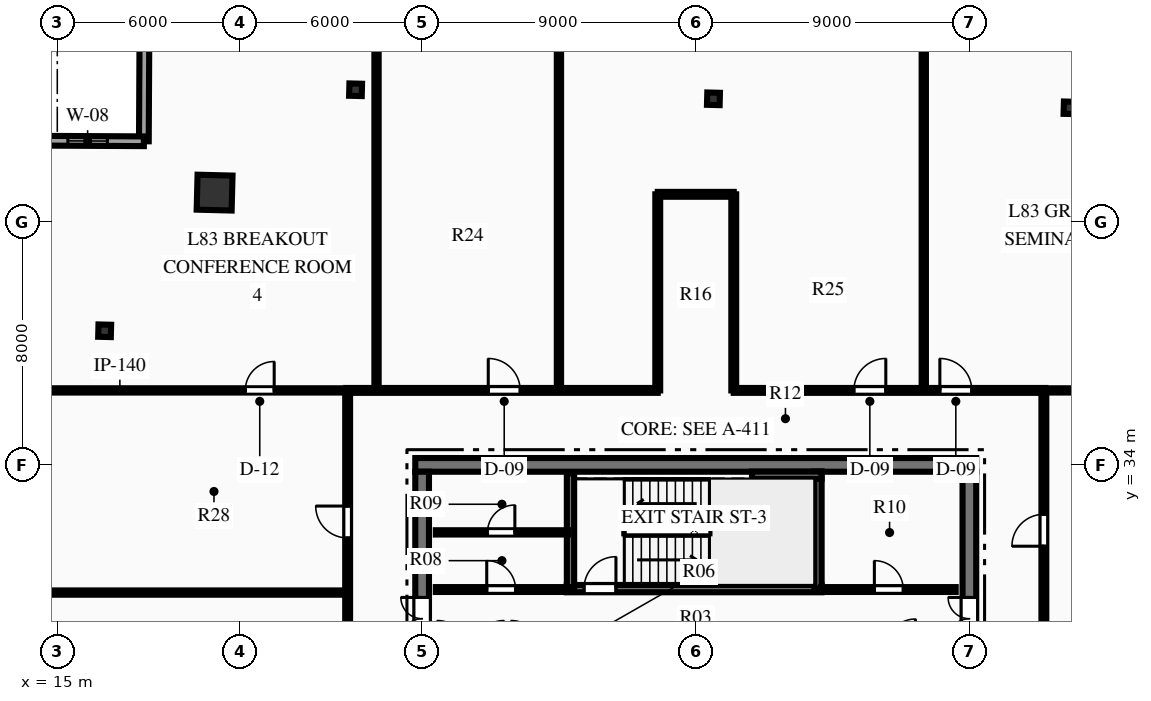
"""IFC4 building model, lengths in metres.
Left out: names, types, materials, properties, quantities, classifications, styles, units other than length and angle.
Written with IfcOpenShell. Run it as: python <this file> out.ifc"""

import sys

from ifc_helpers import new_model, si_unit, direction, frame, frame_2d, origin, origin_2d, place, context, subcontext, project, spatial, rectangle, hollow_rectangle, i_section, extrude, element, fill, save


model = new_model("IFC4")
c1 = context("Model", 3, precision=1e-05, world=origin(), true_north=direction((0.0, 1.0)))
c2 = subcontext(c1, "Body", "Model", "MODEL_VIEW")
j1 = project(units=[si_unit("LENGTHUNIT", "METRE"), si_unit("PLANEANGLEUNIT", "RADIAN")], contexts=[c1])
p1 = place(None, origin())
s1 = spatial("IfcSite", under=j1, at=p1, CompositionType="ELEMENT")
p2 = place(p1, origin())
s2 = spatial("IfcBuilding", under=s1, at=p2, CompositionType="ELEMENT")
p3 = place(p2, frame((0.0, 0.0, 328.95)))
s3 = spatial("IfcBuildingStorey", under=s2, at=p3, CompositionType="ELEMENT", Elevation=328.95)
p4 = place(p3, frame((26.775, 34.0, 0.0), z_axis=(0.0, 0.0, 1.0), x_axis=(1.0, 0.0, 0.0)))
e1 = element("IfcWall", 1, at=p4, inside=s3, PredefinedType="SHEAR", context=c2, shape_type="SweptSolid", body=[
    extrude(rectangle(XDim=18.45, YDim=0.45, at=frame_2d((9.225, 0.0))), origin(), (0.0, 0.0, 1.0), 3.75),
])
p5 = place(p3, frame((27.0, 18.225, 0.0), z_axis=(0.0, 0.0, 1.0), x_axis=(0.0, 1.0, 0.0)))
e2 = element("IfcWall", 2, at=p5, inside=s3, PredefinedType="SHEAR", context=c2, shape_type="SweptSolid", body=[
    extrude(rectangle(XDim=15.55, YDim=0.45, at=frame_2d((7.775, 0.0))), origin(), (0.0, 0.0, 1.0), 3.75),
])
p6 = place(p5, frame((10.015, 0.0, 0.0)))
e3 = element("IfcOpeningElement", 3, at=p6, cuts=e2, PredefinedType="OPENING", context=c2, shape_type="SweptSolid", body=[
    extrude(rectangle(XDim=1.4, YDim=2.2, at=frame_2d((0.7, 1.1))), frame((0.0, 0.235, 0.0), z_axis=(0.0, -1.0, 0.0), x_axis=(1.0, 0.0, 0.0)), (0.0, 0.0, 1.0), 0.47),
])
p7 = place(p3, frame((45.0, 18.225, 0.0), z_axis=(0.0, 0.0, 1.0), x_axis=(0.0, 1.0, 0.0)))
e4 = element("IfcWall", 4, at=p7, inside=s3, PredefinedType="SHEAR", context=c2, shape_type="SweptSolid", body=[
    extrude(rectangle(XDim=15.55, YDim=0.45, at=frame_2d((7.775, 0.0))), origin(), (0.0, 0.0, 1.0), 3.75),
])
p8 = place(p7, frame((10.015, 0.0, 0.0)))
e5 = element("IfcOpeningElement", 5, at=p8, cuts=e4, PredefinedType="OPENING", context=c2, shape_type="SweptSolid", body=[
    extrude(rectangle(XDim=1.4, YDim=2.2, at=frame_2d((0.7, 1.1))), frame((0.0, 0.235, 0.0), z_axis=(0.0, -1.0, 0.0), x_axis=(1.0, 0.0, 0.0)), (0.0, 0.0, 1.0), 0.47),
])
p9 = place(p3, frame((31.76, 29.93, 0.0), z_axis=(0.0, 0.0, 1.0), x_axis=(1.0, 0.0, 0.0)))
e6 = element("IfcWall", 6, at=p9, inside=s3, PredefinedType="SHEAR", context=c2, shape_type="SweptSolid", body=[
    extrude(rectangle(XDim=8.38, YDim=0.24, at=frame_2d((4.19, 0.0))), origin(), (0.0, 0.0, 1.0), 3.75),
])
p10 = place(p9, frame((0.565, 0.0, 0.0)))
e7 = element("IfcOpeningElement", 7, at=p10, cuts=e6, PredefinedType="OPENING", context=c2, shape_type="SweptSolid", body=[
    extrude(rectangle(XDim=1.05, YDim=2.15, at=frame_2d((0.525, 1.075))), frame((0.0, 0.13, 0.0), z_axis=(0.0, -1.0, 0.0), x_axis=(1.0, 0.0, 0.0)), (0.0, 0.0, 1.0), 0.26),
])
p11 = place(p3, frame((31.88, 29.93, 0.0), z_axis=(0.0, 0.0, 1.0), x_axis=(0.0, 1.0, 0.0)))
e8 = element("IfcWall", 8, at=p11, inside=s3, PredefinedType="SHEAR", context=c2, shape_type="SweptSolid", body=[
    extrude(rectangle(XDim=3.79, YDim=0.24, at=frame_2d((1.895, 0.0))), origin(), (0.0, 0.0, 1.0), 3.75),
])
p12 = place(p3, frame((40.02, 29.93, 0.0), z_axis=(0.0, 0.0, 1.0), x_axis=(0.0, 1.0, 0.0)))
e9 = element("IfcWall", 9, at=p12, inside=s3, PredefinedType="SHEAR", context=c2, shape_type="SweptSolid", body=[
    extrude(rectangle(XDim=3.85, YDim=0.24, at=frame_2d((1.925, 0.0))), origin(), (0.0, 0.0, 1.0), 3.75),
])
p13 = place(p3, frame((37.85, 33.66, 0.0), z_axis=(0.0, 0.0, 1.0), x_axis=(1.0, 0.0, 0.0)))
e10 = element("IfcWall", 10, at=p13, inside=s3, PredefinedType="SHEAR", context=c2, shape_type="SweptSolid", body=[
    extrude(rectangle(XDim=2.29, YDim=0.24, at=frame_2d((1.145, 0.0))), origin(), (0.0, 0.0, 1.0), 3.75),
])
p14 = place(p3, frame((20.174, 42.956, 0.0), z_axis=(0.0, 0.0, 1.0), x_axis=(0.025304572866, 0.999679788028, 0.0)))
e11 = element("IfcColumn", 11, at=p14, inside=s3, PredefinedType="COLUMN", context=c2, shape_type="SweptSolid", body=[
    extrude(hollow_rectangle(XDim=1.15, YDim=1.15, WallThickness=0.05, at=origin_2d()), origin(), (0.0, 0.0, 1.0), 3.75),
])
for number, where, z_axis, x_axis in (
    (12, (48.312, 45.745, 0.0), (0.0, 0.0, 1.0), (0.025, 1.0, 0.0)),
    (13, (36.582, 46.042, 0.0), (0.0, 0.0, 1.0), (0.025, 1.0, 0.0)),
    (14, (24.811, 46.34, 0.0), (0.0, 0.0, 1.0), (0.025, 1.0, 0.0)),
    (15, (16.558, 38.412, 0.0), (0.0, 0.0, 1.0), (0.025, 1.0, 0.0)),
):
    element("IfcColumn", number, at=place(p3, frame(where, z_axis=z_axis, x_axis=x_axis)), inside=s3, PredefinedType="COLUMN", context=c2, shape_type="SweptSolid", body=[
        extrude(i_section(OverallWidth=0.406, OverallDepth=0.416, WebThickness=0.03, FlangeThickness=0.048, at=origin_2d()), origin(), (0.0, 0.0, 1.0), 3.75),
    ])
p15 = place(p3, frame((17.847, 44.645, 0.0), z_axis=(0.0, 0.0, 1.0), x_axis=(0.005212730233, 0.999986413629, 0.0)))
e16 = element("IfcWall", 16, at=p15, inside=s3, PredefinedType="STANDARD", context=c2, shape_type="SweptSolid", body=[
    extrude(rectangle(XDim=3.7, YDim=0.32, at=frame_2d((1.85, 0.0))), origin(), (0.0, 0.0, 1.0), 3.49),
])
p16 = place(p3, frame((14.147, 44.665, 0.0), z_axis=(0.0, 0.0, 1.0), x_axis=(0.999986067501, -0.005278712333, 0.0)))
e17 = element("IfcWall", 17, at=p16, inside=s3, PredefinedType="STANDARD", context=c2, shape_type="SweptSolid", body=[
    extrude(rectangle(XDim=3.7, YDim=0.32, at=frame_2d((1.85, 0.0))), origin(), (0.0, 0.0, 1.0), 3.49),
])
p17 = place(p16, frame((1.2, 0.0, 0.85)))
e18 = element("IfcOpeningElement", 18, at=p17, cuts=e17, PredefinedType="OPENING", context=c2, shape_type="SweptSolid", body=[
    extrude(rectangle(XDim=1.3, YDim=1.9, at=frame_2d((0.65, 0.95))), frame((0.0, 0.17, 0.0), z_axis=(0.0, -1.0, 0.0), x_axis=(1.0, 0.0, 0.0)), (0.0, 0.0, 1.0), 0.34),
])
p18 = place(p3, frame((27.45, 29.9, 0.0), z_axis=(0.0, 0.0, 1.0), x_axis=(1.0, 0.0, 0.0)))
e19 = element("IfcWall", 19, at=p18, inside=s3, PredefinedType="PARTITIONING", context=c2, shape_type="SweptSolid", body=[
    extrude(rectangle(XDim=4.43, YDim=0.16, at=frame_2d((2.215, 0.0))), origin(), (0.0, 0.0, 1.0), 3.49),
])
p19 = place(p18, frame((1.675, 0.0, 0.0)))
e20 = element("IfcOpeningElement", 20, at=p19, cuts=e19, PredefinedType="OPENING", context=c2, shape_type="SweptSolid", body=[
    extrude(rectangle(XDim=0.95, YDim=2.15, at=frame_2d((0.475, 1.075))), frame((0.0, 0.09, 0.0), z_axis=(0.0, -1.0, 0.0), x_axis=(1.0, 0.0, 0.0)), (0.0, 0.0, 1.0), 0.18),
])
p20 = place(p3, frame((27.45, 31.78, 0.0), z_axis=(0.0, 0.0, 1.0), x_axis=(1.0, 0.0, 0.0)))
e21 = element("IfcWall", 21, at=p20, inside=s3, PredefinedType="PARTITIONING", context=c2, shape_type="SweptSolid", body=[
    extrude(rectangle(XDim=4.35, YDim=0.14, at=frame_2d((2.175, 0.0))), origin(), (0.0, 0.0, 1.0), 3.49),
])
p21 = place(p20, frame((1.7, 0.0, 0.0)))
e22 = element("IfcOpeningElement", 22, at=p21, cuts=e21, PredefinedType="OPENING", context=c2, shape_type="SweptSolid", body=[
    extrude(rectangle(XDim=0.9, YDim=2.15, at=frame_2d((0.45, 1.075))), frame((0.0, 0.08, 0.0), z_axis=(0.0, -1.0, 0.0), x_axis=(1.0, 0.0, 0.0)), (0.0, 0.0, 1.0), 0.16),
])
p22 = place(p3, frame((40.12, 29.9, 0.0), z_axis=(0.0, 0.0, 1.0), x_axis=(1.0, 0.0, 0.0)))
e23 = element("IfcWall", 23, at=p22, inside=s3, PredefinedType="PARTITIONING", context=c2, shape_type="SweptSolid", body=[
    extrude(rectangle(XDim=4.43, YDim=0.16, at=frame_2d((2.215, 0.0))), origin(), (0.0, 0.0, 1.0), 3.49),
])
p23 = place(p22, frame((1.755, 0.0, 0.0)))
e24 = element("IfcOpeningElement", 24, at=p23, cuts=e23, PredefinedType="OPENING", context=c2, shape_type="SweptSolid", body=[
    extrude(rectangle(XDim=0.95, YDim=2.15, at=frame_2d((0.475, 1.075))), frame((0.0, 0.09, 0.0), z_axis=(0.0, -1.0, 0.0), x_axis=(1.0, 0.0, 0.0)), (0.0, 0.0, 1.0), 0.18),
])
p24 = place(p3, frame((24.5, 36.45, 0.0), z_axis=(0.0, 0.0, 1.0), x_axis=(1.0, 0.0, 0.0)))
e25 = element("IfcWall", 25, at=p24, inside=s3, PredefinedType="PARTITIONING", context=c2, shape_type="SweptSolid", body=[
    extrude(rectangle(XDim=10.25, YDim=0.16, at=frame_2d((5.125, 0.0))), origin(), (0.0, 0.0, 1.0), 3.49),
])
p25 = place(p24, frame((4.675, 0.0, 0.0)))
e26 = element("IfcOpeningElement", 26, at=p25, cuts=e25, PredefinedType="OPENING", context=c2, shape_type="SweptSolid", body=[
    extrude(rectangle(XDim=1.05, YDim=2.15, at=frame_2d((0.525, 1.075))), frame((0.0, 0.09, 0.0), z_axis=(0.0, -1.0, 0.0), x_axis=(1.0, 0.0, 0.0)), (0.0, 0.0, 1.0), 0.18),
])
p26 = place(p3, frame((37.25, 36.45, 0.0), z_axis=(0.0, 0.0, 1.0), x_axis=(1.0, 0.0, 0.0)))
e27 = element("IfcWall", 27, at=p26, inside=s3, PredefinedType="PARTITIONING", context=c2, shape_type="SweptSolid", body=[
    extrude(rectangle(XDim=10.25, YDim=0.16, at=frame_2d((5.125, 0.0))), origin(), (0.0, 0.0, 1.0), 3.49),
])
p27 = place(p26, frame((3.951, 0.0, 0.0)))
e28 = element("IfcOpeningElement", 28, at=p27, cuts=e27, PredefinedType="OPENING", context=c2, shape_type="SweptSolid", body=[
    extrude(rectangle(XDim=1.05, YDim=2.15, at=frame_2d((0.525, 1.075))), frame((0.0, 0.09, 0.0), z_axis=(0.0, -1.0, 0.0), x_axis=(1.0, 0.0, 0.0)), (0.0, 0.0, 1.0), 0.18),
])
p28 = place(p26, frame((6.779, 0.0, 0.0)))
e29 = element("IfcOpeningElement", 29, at=p28, cuts=e27, PredefinedType="OPENING", context=c2, shape_type="SweptSolid", body=[
    extrude(rectangle(XDim=1.05, YDim=2.15, at=frame_2d((0.525, 1.075))), frame((0.0, 0.09, 0.0), z_axis=(0.0, -1.0, 0.0), x_axis=(1.0, 0.0, 0.0)), (0.0, 0.0, 1.0), 0.18),
])
p29 = place(p3, frame((24.55, 27.25, 0.0), z_axis=(0.0, 0.0, 1.0), x_axis=(0.0, 1.0, 0.0)))
e30 = element("IfcWall", 30, at=p29, inside=s3, PredefinedType="PARTITIONING", context=c2, shape_type="SweptSolid", body=[
    extrude(rectangle(XDim=9.2, YDim=0.16, at=frame_2d((4.6, 0.0))), origin(), (0.0, 0.0, 1.0), 3.49),
])
p30 = place(p29, frame((4.346, 0.0, 0.0)))
e31 = element("IfcOpeningElement", 31, at=p30, cuts=e30, PredefinedType="OPENING", context=c2, shape_type="SweptSolid", body=[
    extrude(rectangle(XDim=1.05, YDim=2.15, at=frame_2d((0.525, 1.075))), frame((0.0, 0.09, 0.0), z_axis=(0.0, -1.0, 0.0), x_axis=(1.0, 0.0, 0.0)), (0.0, 0.0, 1.0), 0.18),
])
p31 = place(p3, frame((47.45, 27.25, 0.0), z_axis=(0.0, 0.0, 1.0), x_axis=(0.0, 1.0, 0.0)))
e32 = element("IfcWall", 32, at=p31, inside=s3, PredefinedType="PARTITIONING", context=c2, shape_type="SweptSolid", body=[
    extrude(rectangle(XDim=9.2, YDim=0.16, at=frame_2d((4.6, 0.0))), origin(), (0.0, 0.0, 1.0), 3.49),
])
p32 = place(p31, frame((4.075, 0.0, 0.0)))
e33 = element("IfcOpeningElement", 33, at=p32, cuts=e32, PredefinedType="OPENING", context=c2, shape_type="SweptSolid", body=[
    extrude(rectangle(XDim=1.05, YDim=2.15, at=frame_2d((0.525, 1.075))), frame((0.0, 0.09, 0.0), z_axis=(0.0, -1.0, 0.0), x_axis=(1.0, 0.0, 0.0)), (0.0, 0.0, 1.0), 0.18),
])
for number, where, z_axis, x_axis in (
    (34, (34.75, 36.45, 0.0), (0.0, 0.0, 1.0), (0.0, 1.0, 0.0)),
    (35, (37.25, 36.45, 0.0), (0.0, 0.0, 1.0), (0.0, 1.0, 0.0)),
):
    element("IfcWall", number, at=place(p3, frame(where, z_axis=z_axis, x_axis=x_axis)), inside=s3, PredefinedType="PARTITIONING", context=c2, shape_type="SweptSolid", body=[
        extrude(rectangle(XDim=6.45, YDim=0.16, at=frame_2d((3.225, 0.0))), origin(), (0.0, 0.0, 1.0), 3.49),
    ])
p33 = place(p3, frame((34.75, 42.9, 0.0), z_axis=(0.0, 0.0, 1.0), x_axis=(1.0, 0.0, 0.0)))
e36 = element("IfcWall", 36, at=p33, inside=s3, PredefinedType="PARTITIONING", context=c2, shape_type="SweptSolid", body=[
    extrude(rectangle(XDim=2.5, YDim=0.16, at=frame_2d((1.25, 0.0))), origin(), (0.0, 0.0, 1.0), 3.49),
])
p34 = place(p3, frame((14.144, 36.45, 0.0), z_axis=(0.0, 0.0, 1.0), x_axis=(1.0, 0.0, 0.0)))
e37 = element("IfcWall", 37, at=p34, inside=s3, PredefinedType="PARTITIONING", context=c2, shape_type="SweptSolid", body=[
    extrude(rectangle(XDim=10.406, YDim=0.14, at=frame_2d((5.203, 0.0))), origin(), (0.0, 0.0, 1.0), 2.868),
])
p35 = place(p34, frame((7.04, 0.0, 0.0)))
e38 = element("IfcOpeningElement", 38, at=p35, cuts=e37, PredefinedType="OPENING", context=c2, shape_type="SweptSolid", body=[
    extrude(rectangle(XDim=0.95, YDim=2.15, at=frame_2d((0.475, 1.075))), frame((0.0, 0.08, 0.0), z_axis=(0.0, -1.0, 0.0), x_axis=(1.0, 0.0, 0.0)), (0.0, 0.0, 1.0), 0.16),
])
p36 = place(p3, frame((47.45, 36.45, 0.0), z_axis=(0.0, 0.0, 1.0), x_axis=(1.0, 0.0, 0.0)))
e39 = element("IfcWall", 39, at=p36, inside=s3, PredefinedType="PARTITIONING", context=c2, shape_type="SweptSolid", body=[
    extrude(rectangle(XDim=10.69, YDim=0.14, at=frame_2d((5.345, 0.0))), origin(), (0.0, 0.0, 1.0), 2.868),
])
p37 = place(p3, frame((25.5, 36.45, 0.0), z_axis=(0.0, 0.0, 1.0), x_axis=(0.0, 1.0, 0.0)))
e40 = element("IfcWall", 40, at=p37, inside=s3, PredefinedType="PARTITIONING", context=c2, shape_type="SweptSolid", body=[
    extrude(rectangle(XDim=11.815, YDim=0.14, at=frame_2d((5.908, 0.0))), origin(), (0.0, 0.0, 1.0), 2.868),
])
p38 = place(p3, frame((31.5, 36.45, 0.0), z_axis=(0.0, 0.0, 1.0), x_axis=(0.0, 1.0, 0.0)))
e41 = element("IfcWall", 41, at=p38, inside=s3, PredefinedType="PARTITIONING", context=c2, shape_type="SweptSolid", body=[
    extrude(rectangle(XDim=11.784, YDim=0.14, at=frame_2d((5.892, 0.0))), origin(), (0.0, 0.0, 1.0), 3.49),
])
p39 = place(p3, frame((43.5, 36.45, 0.0), z_axis=(0.0, 0.0, 1.0), x_axis=(0.0, 1.0, 0.0)))
e42 = element("IfcWall", 42, at=p39, inside=s3, PredefinedType="PARTITIONING", context=c2, shape_type="SweptSolid", body=[
    extrude(rectangle(XDim=11.721, YDim=0.14, at=frame_2d((5.86, 0.0))), origin(), (0.0, 0.0, 1.0), 3.49),
])
p40 = place(p3, frame((14.11, 29.8, 0.0), z_axis=(0.0, 0.0, 1.0), x_axis=(1.0, 0.0, 0.0)))
e43 = element("IfcWall", 43, at=p40, inside=s3, PredefinedType="PARTITIONING", context=c2, shape_type="SweptSolid", body=[
    extrude(rectangle(XDim=10.44, YDim=0.14, at=frame_2d((5.22, 0.0))), origin(), (0.0, 0.0, 1.0), 3.49),
])
p41 = place(p17, origin())
e44 = element("IfcWindow", 44, at=p41, inside=s3, PartitioningType="SINGLE_PANEL", PredefinedType="WINDOW", context=c2, shape_type="SweptSolid", body=[
    extrude(rectangle(XDim=1.3, YDim=1.9, at=frame_2d((0.65, 0.95))), frame((0.0, 0.03, 0.0), z_axis=(0.0, -1.0, 0.0), x_axis=(1.0, 0.0, 0.0)), (0.0, 0.0, 1.0), 0.06),
])
fill(e18, e44)
p42 = place(p19, origin())
e45 = element("IfcDoor", 45, at=p42, inside=s3, OperationType="SINGLE_SWING_LEFT", PredefinedType="DOOR", context=c2, shape_type="SweptSolid", body=[
    extrude(rectangle(XDim=0.95, YDim=2.15, at=frame_2d((0.475, 1.075))), frame((0.0, 0.025, 0.0), z_axis=(0.0, -1.0, 0.0), x_axis=(1.0, 0.0, 0.0)), (0.0, 0.0, 1.0), 0.05),
])
fill(e20, e45)
p43 = place(p21, origin())
e46 = element("IfcDoor", 46, at=p43, inside=s3, OperationType="SINGLE_SWING_RIGHT", PredefinedType="DOOR", context=c2, shape_type="SweptSolid", body=[
    extrude(rectangle(XDim=0.9, YDim=2.15, at=frame_2d((0.45, 1.075))), frame((0.0, 0.025, 0.0), z_axis=(0.0, -1.0, 0.0), x_axis=(1.0, 0.0, 0.0)), (0.0, 0.0, 1.0), 0.05),
])
fill(e22, e46)
p44 = place(p23, origin())
e47 = element("IfcDoor", 47, at=p44, inside=s3, OperationType="SINGLE_SWING_LEFT", PredefinedType="DOOR", context=c2, shape_type="SweptSolid", body=[
    extrude(rectangle(XDim=0.95, YDim=2.15, at=frame_2d((0.475, 1.075))), frame((0.0, 0.025, 0.0), z_axis=(0.0, -1.0, 0.0), x_axis=(1.0, 0.0, 0.0)), (0.0, 0.0, 1.0), 0.05),
])
fill(e24, e47)
p45 = place(p10, origin())
e48 = element("IfcDoor", 48, at=p45, inside=s3, OperationType="SINGLE_SWING_RIGHT", PredefinedType="DOOR", context=c2, shape_type="SweptSolid", body=[
    extrude(rectangle(XDim=1.05, YDim=2.15, at=frame_2d((0.525, 1.075))), frame((0.0, 0.025, 0.0), z_axis=(0.0, -1.0, 0.0), x_axis=(1.0, 0.0, 0.0)), (0.0, 0.0, 1.0), 0.05),
])
fill(e7, e48)
p46 = place(p6, origin())
e49 = element("IfcDoor", 49, at=p46, inside=s3, OperationType="DOUBLE_DOOR_SINGLE_SWING", PredefinedType="DOOR", context=c2, shape_type="SweptSolid", body=[
    extrude(rectangle(XDim=1.4, YDim=2.2, at=frame_2d((0.7, 1.1))), frame((0.0, 0.025, 0.0), z_axis=(0.0, -1.0, 0.0), x_axis=(1.0, 0.0, 0.0)), (0.0, 0.0, 1.0), 0.05),
])
fill(e3, e49)
p47 = place(p8, origin())
e50 = element("IfcDoor", 50, at=p47, inside=s3, OperationType="DOUBLE_DOOR_SINGLE_SWING", PredefinedType="DOOR", context=c2, shape_type="SweptSolid", body=[
    extrude(rectangle(XDim=1.4, YDim=2.2, at=frame_2d((0.7, 1.1))), frame((0.0, 0.025, 0.0), z_axis=(0.0, -1.0, 0.0), x_axis=(1.0, 0.0, 0.0)), (0.0, 0.0, 1.0), 0.05),
])
fill(e5, e50)
p48 = place(p35, origin())
e51 = element("IfcDoor", 51, at=p48, inside=s3, OperationType="SINGLE_SWING_RIGHT", PredefinedType="DOOR", context=c2, shape_type="SweptSolid", body=[
    extrude(rectangle(XDim=0.95, YDim=2.15, at=frame_2d((0.475, 1.075))), frame((0.0, 0.025, 0.0), z_axis=(0.0, -1.0, 0.0), x_axis=(1.0, 0.0, 0.0)), (0.0, 0.0, 1.0), 0.05),
])
fill(e38, e51)
p49 = place(p25, origin())
e52 = element("IfcDoor", 52, at=p49, inside=s3, OperationType="SINGLE_SWING_LEFT", PredefinedType="DOOR", context=c2, shape_type="SweptSolid", body=[
    extrude(rectangle(XDim=1.05, YDim=2.15, at=frame_2d((0.525, 1.075))), frame((0.0, 0.025, 0.0), z_axis=(0.0, -1.0, 0.0), x_axis=(1.0, 0.0, 0.0)), (0.0, 0.0, 1.0), 0.05),
])
fill(e26, e52)
p50 = place(p27, origin())
e53 = element("IfcDoor", 53, at=p50, inside=s3, OperationType="SINGLE_SWING_RIGHT", PredefinedType="DOOR", context=c2, shape_type="SweptSolid", body=[
    extrude(rectangle(XDim=1.05, YDim=2.15, at=frame_2d((0.525, 1.075))), frame((0.0, 0.025, 0.0), z_axis=(0.0, -1.0, 0.0), x_axis=(1.0, 0.0, 0.0)), (0.0, 0.0, 1.0), 0.05),
])
fill(e28, e53)
p51 = place(p28, origin())
e54 = element("IfcDoor", 54, at=p51, inside=s3, OperationType="SINGLE_SWING_LEFT", PredefinedType="DOOR", context=c2, shape_type="SweptSolid", body=[
    extrude(rectangle(XDim=1.05, YDim=2.15, at=frame_2d((0.525, 1.075))), frame((0.0, 0.025, 0.0), z_axis=(0.0, -1.0, 0.0), x_axis=(1.0, 0.0, 0.0)), (0.0, 0.0, 1.0), 0.05),
])
fill(e29, e54)
p52 = place(p30, origin())
e55 = element("IfcDoor", 55, at=p52, inside=s3, OperationType="SINGLE_SWING_RIGHT", PredefinedType="DOOR", context=c2, shape_type="SweptSolid", body=[
    extrude(rectangle(XDim=1.05, YDim=2.15, at=frame_2d((0.525, 1.075))), frame((0.0, 0.025, 0.0), z_axis=(0.0, -1.0, 0.0), x_axis=(1.0, 0.0, 0.0)), (0.0, 0.0, 1.0), 0.05),
])
fill(e31, e55)
p53 = place(p32, origin())
e56 = element("IfcDoor", 56, at=p53, inside=s3, OperationType="SINGLE_SWING_LEFT", PredefinedType="DOOR", context=c2, shape_type="SweptSolid", body=[
    extrude(rectangle(XDim=1.05, YDim=2.15, at=frame_2d((0.525, 1.075))), frame((0.0, 0.025, 0.0), z_axis=(0.0, -1.0, 0.0), x_axis=(1.0, 0.0, 0.0)), (0.0, 0.0, 1.0), 0.05),
])
fill(e33, e56)
save(model, sys.argv[1])
